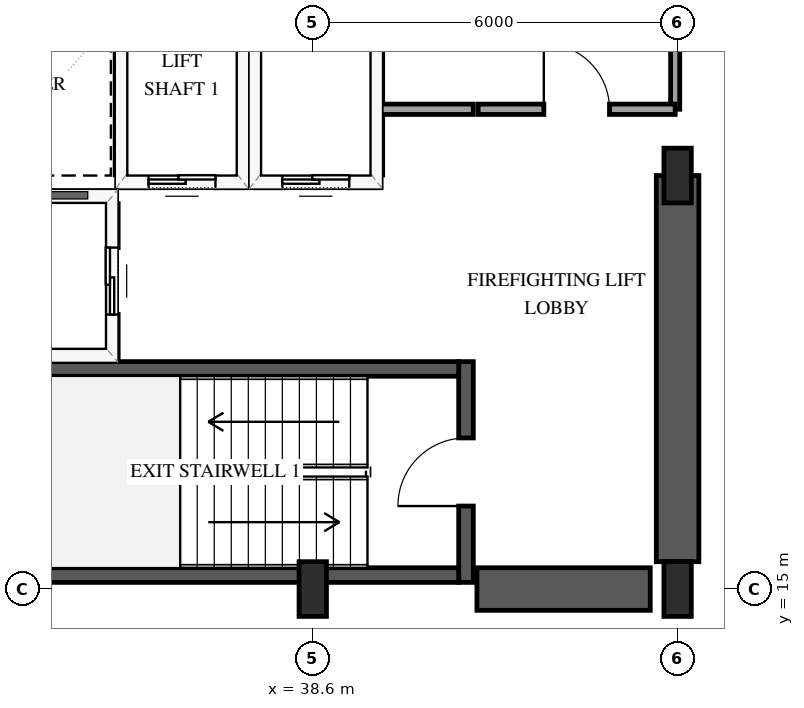
"""IFC4 building model, lengths in metres.
Left out: names, types, materials, properties, quantities, classifications, styles, units other than length and angle.
Written with IfcOpenShell. Run it as: python <this file> out.ifc"""

import sys

from ifc_helpers import new_model, si_unit, direction, frame, frame_2d, origin, origin_2d, place, context, subcontext, project, spatial, rectangle, extrude, element, fill, save


model = new_model("IFC4")
c1 = context("Model", 3, precision=1e-05, world=origin(), true_north=direction((0.0, 1.0)))
c2 = subcontext(c1, "Body", "Model", "MODEL_VIEW")
j1 = project(units=[si_unit("LENGTHUNIT", "METRE"), si_unit("PLANEANGLEUNIT", "RADIAN")], contexts=[c1])
p1 = place(None, origin())
s1 = spatial("IfcSite", under=j1, at=p1, CompositionType="ELEMENT")
p2 = place(p1, origin())
s2 = spatial("IfcBuilding", under=s1, at=p2, CompositionType="ELEMENT")
p3 = place(p2, frame((0.0, 0.0, 62.6)))
s3 = spatial("IfcBuildingStorey", under=s2, at=p3, CompositionType="ELEMENT", Elevation=62.6)
p4 = place(p3, frame((41.12, 15.11, 0.0), z_axis=(0.0, 0.0, 1.0), x_axis=(0.0, 1.0, 0.0)))
e1 = element("IfcWall", 1, at=p4, inside=s3, PredefinedType="SHEAR", context=c2, shape_type="SweptSolid", body=[
    extrude(rectangle(XDim=3.63, YDim=0.24, at=frame_2d((1.815, 0.0))), origin(), (0.0, 0.0, 1.0), 4.0),
])
p5 = place(p4, frame((1.255, 0.0, 0.0)))
e2 = element("IfcOpeningElement", 2, at=p5, cuts=e1, PredefinedType="OPENING", context=c2, shape_type="SweptSolid", body=[
    extrude(rectangle(XDim=1.12, YDim=2.15, at=frame_2d((0.56, 1.075))), frame((0.0, 0.13, 0.0), z_axis=(0.0, -1.0, 0.0), x_axis=(1.0, 0.0, 0.0)), (0.0, 0.0, 1.0), 0.26),
])
for number, where, z_axis, x_axis in (
    (3, (33.0, 15.23, 0.0), (0.0, 0.0, 1.0), (1.0, 0.0, 0.0)),
    (4, (33.0, 18.62, 0.0), (0.0, 0.0, 1.0), (1.0, 0.0, 0.0)),
):
    element("IfcWall", number, at=place(p3, frame(where, z_axis=z_axis, x_axis=x_axis)), inside=s3, PredefinedType="SHEAR", context=c2, shape_type="SweptSolid", body=[
        extrude(rectangle(XDim=8.0, YDim=0.24, at=frame_2d((4.0, 0.0))), origin(), (0.0, 0.0, 1.0), 4.0),
    ])
p6 = place(p3, frame((41.3, 15.0, 0.0), z_axis=(0.0, 0.0, 1.0), x_axis=(1.0, 0.0, 0.0)))
e5 = element("IfcWall", 5, at=p6, inside=s3, PredefinedType="SHEAR", context=c2, shape_type="SweptSolid", body=[
    extrude(rectangle(XDim=2.85, YDim=0.7, at=frame_2d((1.425, 0.0))), origin(), (0.0, 0.0, 1.0), 4.0),
])
p7 = place(p3, frame((44.6, 15.45, 0.0), z_axis=(0.0, 0.0, 1.0), x_axis=(0.0, 1.0, 0.0)))
e6 = element("IfcWall", 6, at=p7, inside=s3, PredefinedType="SHEAR", context=c2, shape_type="SweptSolid", body=[
    extrude(rectangle(XDim=6.35, YDim=0.7, at=frame_2d((3.175, 0.0))), origin(), (0.0, 0.0, 1.0), 4.0),
])
for number, where, z_axis, x_axis in (
    (7, (38.6, 15.0, 0.0), (0.0, 0.0, 1.0), (1.0, 0.0, 0.0)),
    (8, (44.6, 15.0, 0.0), (0.0, 0.0, 1.0), (1.0, 0.0, 0.0)),
    (9, (44.6, 21.8, 0.0), (0.0, 0.0, 1.0), (1.0, 0.0, 0.0)),
):
    element("IfcColumn", number, at=place(p3, frame(where, z_axis=z_axis, x_axis=x_axis)), inside=s3, PredefinedType="PILASTER", context=c2, shape_type="SweptSolid", body=[
        extrude(rectangle(XDim=0.45, YDim=0.9, at=origin_2d()), origin(), (0.0, 0.0, 1.0), 4.0),
    ])
p8 = place(p3, frame((35.45, 21.7, 0.0), z_axis=(0.0, 0.0, 1.0), x_axis=(1.0, 0.0, 0.0)))
e10 = element("IfcWall", 10, at=p8, inside=s3, PredefinedType="SOLIDWALL", context=c2, shape_type="SweptSolid", body=[
    extrude(rectangle(XDim=2.0, YDim=0.2, at=frame_2d((1.0, 0.0))), origin(), (0.0, 0.0, 1.0), 3.7),
])
p9 = place(p8, frame((0.45, 0.0, 0.0)))
e11 = element("IfcOpeningElement", 11, at=p9, cuts=e10, PredefinedType="OPENING", context=c2, shape_type="SweptSolid", body=[
    extrude(rectangle(XDim=1.1, YDim=2.15, at=frame_2d((0.55, 1.075))), frame((0.0, 0.11, 0.0), z_axis=(0.0, -1.0, 0.0), x_axis=(1.0, 0.0, 0.0)), (0.0, 0.0, 1.0), 0.22),
])
for number, where, z_axis, x_axis in (
    (12, (35.45, 21.81, 0.0), (0.0, 0.0, 1.0), (0.0, 1.0, 0.0)),
    (13, (37.45, 21.81, 0.0), (0.0, 0.0, 1.0), (0.0, 1.0, 0.0)),
):
    element("IfcWall", number, at=place(p3, frame(where, z_axis=z_axis, x_axis=x_axis)), inside=s3, PredefinedType="SOLIDWALL", context=c2, shape_type="SweptSolid", body=[
        extrude(rectangle(XDim=2.38, YDim=0.2, at=frame_2d((1.19, 0.0))), origin(), (0.0, 0.0, 1.0), 3.7),
    ])
p10 = place(p3, frame((37.65, 21.7, 0.0), z_axis=(0.0, 0.0, 1.0), x_axis=(1.0, 0.0, 0.0)))
e14 = element("IfcWall", 14, at=p10, inside=s3, PredefinedType="SOLIDWALL", context=c2, shape_type="SweptSolid", body=[
    extrude(rectangle(XDim=2.0, YDim=0.2, at=frame_2d((1.0, 0.0))), origin(), (0.0, 0.0, 1.0), 3.7),
])
p11 = place(p10, frame((0.45, 0.0, 0.0)))
e15 = element("IfcOpeningElement", 15, at=p11, cuts=e14, PredefinedType="OPENING", context=c2, shape_type="SweptSolid", body=[
    extrude(rectangle(XDim=1.1, YDim=2.15, at=frame_2d((0.55, 1.075))), frame((0.0, 0.11, 0.0), z_axis=(0.0, -1.0, 0.0), x_axis=(1.0, 0.0, 0.0)), (0.0, 0.0, 1.0), 0.22),
])
p12 = place(p3, frame((39.65, 21.81, 0.0), z_axis=(0.0, 0.0, 1.0), x_axis=(0.0, 1.0, 0.0)))
e16 = element("IfcWall", 16, at=p12, inside=s3, PredefinedType="SOLIDWALL", context=c2, shape_type="SweptSolid", body=[
    extrude(rectangle(XDim=2.38, YDim=0.2, at=frame_2d((1.19, 0.0))), origin(), (0.0, 0.0, 1.0), 3.7),
])
p13 = place(p3, frame((32.72, 21.45, 0.0), z_axis=(0.0, 0.0, 1.0), x_axis=(1.0, 0.0, 0.0)))
e17 = element("IfcWall", 17, at=p13, inside=s3, PredefinedType="SOLIDWALL", context=c2, shape_type="SweptSolid", body=[
    extrude(rectangle(XDim=2.58, YDim=0.2, at=frame_2d((1.29, 0.0))), origin(), (0.0, 0.0, 1.0), 3.7),
])
p14 = place(p3, frame((35.3, 18.79, 0.0), z_axis=(0.0, 0.0, 1.0), x_axis=(0.0, 1.0, 0.0)))
e18 = element("IfcWall", 18, at=p14, inside=s3, PredefinedType="SOLIDWALL", context=c2, shape_type="SweptSolid", body=[
    extrude(rectangle(XDim=2.55, YDim=0.2, at=frame_2d((1.275, 0.0))), origin(), (0.0, 0.0, 1.0), 3.7),
])
p15 = place(p14, frame((0.725, 0.0, 0.0)))
e19 = element("IfcOpeningElement", 19, at=p15, cuts=e18, PredefinedType="OPENING", context=c2, shape_type="SweptSolid", body=[
    extrude(rectangle(XDim=1.1, YDim=2.15, at=frame_2d((0.55, 1.075))), frame((0.0, 0.11, 0.0), z_axis=(0.0, -1.0, 0.0), x_axis=(1.0, 0.0, 0.0)), (0.0, 0.0, 1.0), 0.22),
])
p16 = place(p3, frame((44.56, 29.8, 0.0), z_axis=(0.0, 0.0, 1.0), x_axis=(0.0, -1.0, 0.0)))
e20 = element("IfcWall", 20, at=p16, inside=s3, PredefinedType="PARTITIONING", context=c2, shape_type="SweptSolid", body=[
    extrude(rectangle(XDim=6.91, YDim=0.15, at=frame_2d((3.455, 0.0))), origin(), (0.0, 0.0, 1.0), 2.74),
])
p17 = place(p16, frame((2.915, 0.0, 0.0)))
e21 = element("IfcOpeningElement", 21, at=p17, cuts=e20, PredefinedType="OPENING", context=c2, shape_type="SweptSolid", body=[
    extrude(rectangle(XDim=1.08, YDim=2.15, at=frame_2d((0.54, 1.075))), frame((0.0, 0.085, 0.0), z_axis=(0.0, -1.0, 0.0), x_axis=(1.0, 0.0, 0.0)), (0.0, 0.0, 1.0), 0.17),
])
p18 = place(p3, frame((41.32, 22.89, 0.0), z_axis=(0.0, 0.0, 1.0), x_axis=(1.0, 0.0, 0.0)))
e22 = element("IfcWall", 22, at=p18, inside=s3, PredefinedType="PARTITIONING", context=c2, shape_type="SweptSolid", body=[
    extrude(rectangle(XDim=3.24, YDim=0.17, at=frame_2d((1.62, 0.0))), origin(), (0.0, 0.0, 1.0), 3.7),
])
p19 = place(p18, frame((1.08, 0.0, 0.0)))
e23 = element("IfcOpeningElement", 23, at=p19, cuts=e22, PredefinedType="OPENING", context=c2, shape_type="SweptSolid", body=[
    extrude(rectangle(XDim=1.08, YDim=2.15, at=frame_2d((0.54, 1.075))), frame((0.0, 0.095, 0.0), z_axis=(0.0, -1.0, 0.0), x_axis=(1.0, 0.0, 0.0)), (0.0, 0.0, 1.0), 0.19),
])
p20 = place(p3, frame((39.72, 22.89, 0.0), z_axis=(0.0, 0.0, 1.0), x_axis=(1.0, 0.0, 0.0)))
e24 = element("IfcWall", 24, at=p20, inside=s3, PredefinedType="PARTITIONING", context=c2, shape_type="SweptSolid", body=[
    extrude(rectangle(XDim=1.52, YDim=0.17, at=frame_2d((0.76, 0.0))), origin(), (0.0, 0.0, 1.0), 3.7),
])
p21 = place(p9, origin())
e25 = element("IfcDoor", 25, at=p21, inside=s3, OperationType="SLIDING_TO_LEFT", PredefinedType="DOOR", context=c2, shape_type="SweptSolid", body=[
    extrude(rectangle(XDim=1.1, YDim=2.15, at=frame_2d((0.55, 1.075))), frame((0.0, 0.025, 0.0), z_axis=(0.0, -1.0, 0.0), x_axis=(1.0, 0.0, 0.0)), (0.0, 0.0, 1.0), 0.05),
])
fill(e11, e25)
p22 = place(p11, origin())
e26 = element("IfcDoor", 26, at=p22, inside=s3, OperationType="SLIDING_TO_LEFT", PredefinedType="DOOR", context=c2, shape_type="SweptSolid", body=[
    extrude(rectangle(XDim=1.1, YDim=2.15, at=frame_2d((0.55, 1.075))), frame((0.0, 0.025, 0.0), z_axis=(0.0, -1.0, 0.0), x_axis=(1.0, 0.0, 0.0)), (0.0, 0.0, 1.0), 0.05),
])
fill(e15, e26)
p23 = place(p15, origin())
e27 = element("IfcDoor", 27, at=p23, inside=s3, OperationType="SLIDING_TO_LEFT", PredefinedType="DOOR", context=c2, shape_type="SweptSolid", body=[
    extrude(rectangle(XDim=1.1, YDim=2.15, at=frame_2d((0.55, 1.075))), frame((0.0, 0.025, 0.0), z_axis=(0.0, -1.0, 0.0), x_axis=(1.0, 0.0, 0.0)), (0.0, 0.0, 1.0), 0.05),
])
fill(e19, e27)
p24 = place(p5, origin())
e28 = element("IfcDoor", 28, at=p24, inside=s3, OperationType="SINGLE_SWING_LEFT", PredefinedType="DOOR", context=c2, shape_type="SweptSolid", body=[
    extrude(rectangle(XDim=1.12, YDim=2.15, at=frame_2d((0.56, 1.075))), frame((0.0, 0.025, 0.0), z_axis=(0.0, -1.0, 0.0), x_axis=(1.0, 0.0, 0.0)), (0.0, 0.0, 1.0), 0.05),
])
fill(e2, e28)
p25 = place(p19, origin())
e29 = element("IfcDoor", 29, at=p25, inside=s3, OperationType="SINGLE_SWING_LEFT", PredefinedType="DOOR", context=c2, shape_type="SweptSolid", body=[
    extrude(rectangle(XDim=1.08, YDim=2.15, at=frame_2d((0.54, 1.075))), frame((0.0, 0.025, 0.0), z_axis=(0.0, -1.0, 0.0), x_axis=(1.0, 0.0, 0.0)), (0.0, 0.0, 1.0), 0.05),
])
fill(e23, e29)
save(model, sys.argv[1])
